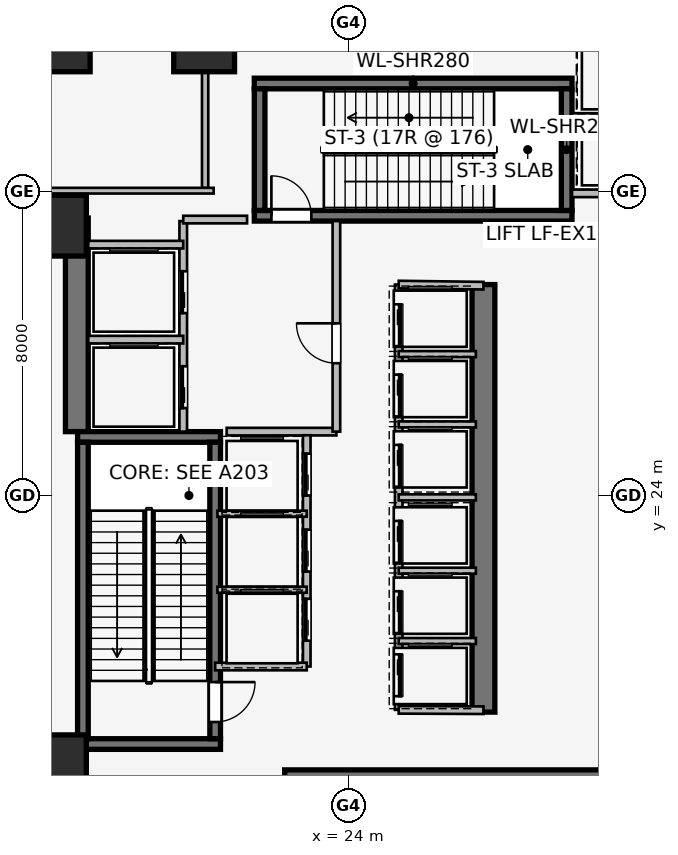
"""IFC4 building model, lengths in metres.
Left out: names, types, materials, properties, quantities, classifications, styles, units other than length and angle.
Written with IfcOpenShell. Run it as: python <this file> out.ifc"""

import sys

from ifc_helpers import new_model, si_unit, direction, frame, frame_2d, origin, origin_2d, place, context, subcontext, project, spatial, rectangle, extrude, element, fill, save


model = new_model("IFC4")
c1 = context("Model", 3, precision=1e-05, world=origin(), true_north=direction((0.0, 1.0)))
c2 = subcontext(c1, "Body", "Model", "MODEL_VIEW")
j1 = project(units=[si_unit("LENGTHUNIT", "METRE"), si_unit("PLANEANGLEUNIT", "RADIAN")], contexts=[c1])
p1 = place(None, origin())
s1 = spatial("IfcSite", under=j1, at=p1, CompositionType="ELEMENT")
p2 = place(p1, origin())
s2 = spatial("IfcBuilding", under=s1, at=p2, CompositionType="ELEMENT")
p3 = place(p2, origin())
s3 = spatial("IfcBuildingStorey", under=s2, at=p3, CompositionType="ELEMENT", Elevation=0.0)
p4 = place(p3, frame((16.85, 25.68, 0.0), z_axis=(0.0, 0.0, 1.0), x_axis=(0.0, 1.0, 0.0)))
e1 = element("IfcWall", 1, at=p4, inside=s3, PredefinedType="SHEAR", context=c2, shape_type="SweptSolid", body=[
    extrude(rectangle(XDim=5.62, YDim=0.6, at=frame_2d((2.81, 0.0))), origin(), (0.0, 0.0, 1.0), 6.0),
])
p5 = place(p3, frame((27.55, 29.55, 0.0), z_axis=(0.0, 0.0, 1.0), x_axis=(0.0, -1.0, 0.0)))
e2 = element("IfcWall", 2, at=p5, inside=s3, PredefinedType="SHEAR", context=c2, shape_type="SweptSolid", body=[
    extrude(rectangle(XDim=11.25, YDim=0.6, at=frame_2d((5.625, 0.0))), origin(), (0.0, 0.0, 1.0), 6.0),
])
for number, where, z_axis, x_axis in (
    (3, (16.87, 17.46, 0.0), (0.0, 0.0, 1.0), (1.0, 0.0, 0.0)),
    (4, (20.63, 25.54, 0.0), (0.0, 0.0, 1.0), (-1.0, 0.0, 0.0)),
):
    element("IfcWall", number, at=place(p3, frame(where, z_axis=z_axis, x_axis=x_axis)), inside=s3, PredefinedType="SHEAR", context=c2, shape_type="SweptSolid", body=[
        extrude(rectangle(XDim=3.76, YDim=0.28, at=frame_2d((1.88, 0.0))), origin(), (0.0, 0.0, 1.0), 6.0),
    ])
p6 = place(p3, frame((17.01, 25.4, 0.0), z_axis=(0.0, 0.0, 1.0), x_axis=(0.0, -1.0, 0.0)))
e5 = element("IfcWall", 5, at=p6, inside=s3, PredefinedType="SHEAR", context=c2, shape_type="SweptSolid", body=[
    extrude(rectangle(XDim=7.8, YDim=0.28, at=frame_2d((3.9, 0.0))), origin(), (0.0, 0.0, 1.0), 6.0),
])
p7 = place(p3, frame((20.49, 25.4, 0.0), z_axis=(0.0, 0.0, 1.0), x_axis=(0.0, -1.0, 0.0)))
e6 = element("IfcWall", 6, at=p7, inside=s3, PredefinedType="SHEAR", context=c2, shape_type="SweptSolid", body=[
    extrude(rectangle(XDim=7.8, YDim=0.28, at=frame_2d((3.9, 0.0))), origin(), (0.0, 0.0, 1.0), 6.0),
])
p8 = place(p7, frame((6.31, 0.0, 0.0)))
e7 = element("IfcOpeningElement", 7, at=p8, cuts=e6, PredefinedType="OPENING", context=c2, shape_type="SweptSolid", body=[
    extrude(rectangle(XDim=1.05, YDim=2.0, at=frame_2d((0.525, 1.0))), frame((0.0, 0.15, 0.0), z_axis=(0.0, -1.0, 0.0), x_axis=(1.0, 0.0, 0.0)), (0.0, 0.0, 1.0), 0.3),
])
p9 = place(p3, frame((30.68, 16.64, 0.0), z_axis=(0.0, 0.0, 1.0), x_axis=(-1.0, 0.0, 0.0)))
e8 = element("IfcWall", 8, at=p9, inside=s3, PredefinedType="SHEAR", context=c2, shape_type="SweptSolid", body=[
    extrude(rectangle(XDim=8.36, YDim=0.28, at=frame_2d((4.18, 0.0))), origin(), (0.0, 0.0, 1.0), 6.0),
])
p10 = place(p3, frame((21.52, 31.36, 0.0), z_axis=(0.0, 0.0, 1.0), x_axis=(1.0, 0.0, 0.0)))
e9 = element("IfcWall", 9, at=p10, inside=s3, PredefinedType="SHEAR", context=c2, shape_type="SweptSolid", body=[
    extrude(rectangle(XDim=8.36, YDim=0.28, at=frame_2d((4.18, 0.0))), origin(), (0.0, 0.0, 1.0), 6.0),
])
p11 = place(p10, frame((0.45, 0.0, 0.0)))
e10 = element("IfcOpeningElement", 10, at=p11, cuts=e9, PredefinedType="OPENING", context=c2, shape_type="SweptSolid", body=[
    extrude(rectangle(XDim=1.05, YDim=2.0, at=frame_2d((0.525, 1.0))), frame((0.0, 0.15, 0.0), z_axis=(0.0, -1.0, 0.0), x_axis=(1.0, 0.0, 0.0)), (0.0, 0.0, 1.0), 0.3),
])
p12 = place(p3, frame((29.88, 34.84, 0.0), z_axis=(0.0, 0.0, 1.0), x_axis=(-1.0, 0.0, 0.0)))
e11 = element("IfcWall", 11, at=p12, inside=s3, PredefinedType="SHEAR", context=c2, shape_type="SweptSolid", body=[
    extrude(rectangle(XDim=8.36, YDim=0.28, at=frame_2d((4.18, 0.0))), origin(), (0.0, 0.0, 1.0), 6.0),
])
for number, where, z_axis, x_axis in (
    (12, (21.66, 34.7, 0.0), (0.0, 0.0, 1.0), (0.0, -1.0, 0.0)),
    (13, (29.74, 31.5, 0.0), (0.0, 0.0, 1.0), (0.0, 1.0, 0.0)),
):
    element("IfcWall", number, at=place(p3, frame(where, z_axis=z_axis, x_axis=x_axis)), inside=s3, PredefinedType="SHEAR", context=c2, shape_type="SweptSolid", body=[
        extrude(rectangle(XDim=3.2, YDim=0.28, at=frame_2d((1.6, 0.0))), origin(), (0.0, 0.0, 1.0), 6.0),
    ])
for number, where, z_axis, x_axis in (
    (14, (16.3, 16.9, 0.0), (0.0, 0.0, 1.0), (1.0, 0.0, 0.0)),
    (15, (16.3, 31.1, 0.0), (0.0, 0.0, 1.0), (1.0, 0.0, 0.0)),
    (16, (20.2, 35.95, 0.0), (0.0, 0.0, 1.0), (1.0, 0.0, 0.0)),
    (17, (16.4, 35.95, 0.0), (0.0, 0.0, 1.0), (1.0, 0.0, 0.0)),
):
    element("IfcColumn", number, at=place(p3, frame(where, z_axis=z_axis, x_axis=x_axis)), inside=s3, PredefinedType="COLUMN", context=c2, shape_type="SweptSolid", body=[
        extrude(rectangle(XDim=1.6, YDim=1.6, at=origin_2d()), origin(), (0.0, 0.0, 1.0), 6.0),
    ])
p13 = place(p3, frame((19.65, 25.68, 0.0), z_axis=(0.0, 0.0, 1.0), x_axis=(0.0, 1.0, 0.0)))
e18 = element("IfcWall", 18, at=p13, inside=s3, PredefinedType="PARTITIONING", context=c2, shape_type="SweptSolid", body=[
    extrude(rectangle(XDim=5.54, YDim=0.2, at=frame_2d((2.77, 0.0))), origin(), (0.0, 0.0, 1.0), 5.69),
])
p14 = place(p13, frame((0.62, 0.0, 0.0)))
e19 = element("IfcOpeningElement", 19, at=p14, cuts=e18, PredefinedType="OPENING", context=c2, shape_type="SweptSolid", body=[
    extrude(rectangle(XDim=1.1, YDim=2.2, at=frame_2d((0.55, 1.1))), frame((0.0, 0.11, 0.0), z_axis=(0.0, -1.0, 0.0), x_axis=(1.0, 0.0, 0.0)), (0.0, 0.0, 1.0), 0.22),
])
p15 = place(p13, frame((3.12, 0.0, 0.0)))
e20 = element("IfcOpeningElement", 20, at=p15, cuts=e18, PredefinedType="OPENING", context=c2, shape_type="SweptSolid", body=[
    extrude(rectangle(XDim=1.1, YDim=2.2, at=frame_2d((0.55, 1.1))), frame((0.0, 0.11, 0.0), z_axis=(0.0, -1.0, 0.0), x_axis=(1.0, 0.0, 0.0)), (0.0, 0.0, 1.0), 0.22),
])
p16 = place(p3, frame((20.793, 25.68, 0.0), z_axis=(0.0, 0.0, 1.0), x_axis=(1.0, 0.0, 0.0)))
e21 = element("IfcWall", 21, at=p16, inside=s3, PredefinedType="PARTITIONING", context=c2, shape_type="SweptSolid", body=[
    extrude(rectangle(XDim=2.887, YDim=0.2, at=frame_2d((1.443, 0.0))), origin(), (0.0, 0.0, 1.0), 5.69),
])
p17 = place(p3, frame((23.68, 25.68, 0.0), z_axis=(0.0, 0.0, 1.0), x_axis=(0.0, 1.0, 0.0)))
e22 = element("IfcWall", 22, at=p17, inside=s3, PredefinedType="PARTITIONING", context=c2, shape_type="SweptSolid", body=[
    extrude(rectangle(XDim=5.54, YDim=0.2, at=frame_2d((2.77, 0.0))), origin(), (0.0, 0.0, 1.0), 5.69),
])
p18 = place(p17, frame((1.8, 0.0, 0.0)))
e23 = element("IfcOpeningElement", 23, at=p18, cuts=e22, PredefinedType="OPENING", context=c2, shape_type="SweptSolid", body=[
    extrude(rectangle(XDim=1.05, YDim=2.0, at=frame_2d((0.525, 1.0))), frame((0.0, 0.11, 0.0), z_axis=(0.0, -1.0, 0.0), x_axis=(1.0, 0.0, 0.0)), (0.0, 0.0, 1.0), 0.22),
])
p19 = place(p3, frame((21.33, 31.26, 0.0), z_axis=(0.0, 0.0, 1.0), x_axis=(-1.0, 0.0, 0.0)))
e24 = element("IfcWall", 24, at=p19, inside=s3, PredefinedType="PARTITIONING", context=c2, shape_type="SweptSolid", body=[
    extrude(rectangle(XDim=1.68, YDim=0.2, at=frame_2d((0.84, 0.0))), origin(), (0.0, 0.0, 1.0), 5.69),
])
p20 = place(p3, frame((17.15, 28.1, 0.0), z_axis=(0.0, 0.0, 1.0), x_axis=(1.0, 0.0, 0.0)))
e25 = element("IfcWall", 25, at=p20, inside=s3, PredefinedType="PARTITIONING", context=c2, shape_type="SweptSolid", body=[
    extrude(rectangle(XDim=2.5, YDim=0.2, at=frame_2d((1.25, 0.0))), origin(), (0.0, 0.0, 1.0), 5.69),
])
p21 = place(p3, frame((19.65, 30.6, 0.0), z_axis=(0.0, 0.0, 1.0), x_axis=(-1.0, 0.0, 0.0)))
e26 = element("IfcWall", 26, at=p21, inside=s3, PredefinedType="PARTITIONING", context=c2, shape_type="SweptSolid", body=[
    extrude(rectangle(XDim=2.5, YDim=0.2, at=frame_2d((1.25, 0.0))), origin(), (0.0, 0.0, 1.0), 4.59),
])
p22 = place(p3, frame((32.48, 31.95, 0.0), z_axis=(0.0, 0.0, 1.0), x_axis=(-1.0, 0.0, 0.0)))
e27 = element("IfcWall", 27, at=p22, inside=s3, PredefinedType="PARTITIONING", context=c2, shape_type="SweptSolid", body=[
    extrude(rectangle(XDim=2.6, YDim=0.2, at=frame_2d((1.3, 0.0))), origin(), (0.0, 0.0, 1.0), 5.69),
])
p23 = place(p3, frame((29.875, 33.98, 0.0), z_axis=(0.0, 0.0, 1.0), x_axis=(1.0, 0.0, 0.0)))
e28 = element("IfcWall", 28, at=p23, inside=s3, PredefinedType="PARTITIONING", context=c2, shape_type="SweptSolid", body=[
    extrude(rectangle(XDim=2.605, YDim=0.16, at=frame_2d((1.302, 0.0))), origin(), (0.0, 0.0, 1.0), 5.69),
])
p24 = place(p3, frame((22.9, 19.5, 0.0), z_axis=(0.0, 0.0, 1.0), x_axis=(0.0, 1.0, 0.0)))
e29 = element("IfcWall", 29, at=p24, inside=s3, PredefinedType="PARTITIONING", context=c2, shape_type="SweptSolid", body=[
    extrude(rectangle(XDim=6.085, YDim=0.2, at=frame_2d((3.042, 0.0))), origin(), (0.0, 0.0, 1.0), 5.69),
])
p25 = place(p24, frame((0.68, 0.0, 0.0)))
e30 = element("IfcOpeningElement", 30, at=p25, cuts=e29, PredefinedType="OPENING", context=c2, shape_type="SweptSolid", body=[
    extrude(rectangle(XDim=1.1, YDim=2.2, at=frame_2d((0.55, 1.1))), frame((0.0, 0.11, 0.0), z_axis=(0.0, -1.0, 0.0), x_axis=(1.0, 0.0, 0.0)), (0.0, 0.0, 1.0), 0.22),
])
p26 = place(p24, frame((2.5, 0.0, 0.0)))
e31 = element("IfcOpeningElement", 31, at=p26, cuts=e29, PredefinedType="OPENING", context=c2, shape_type="SweptSolid", body=[
    extrude(rectangle(XDim=1.1, YDim=2.2, at=frame_2d((0.55, 1.1))), frame((0.0, 0.11, 0.0), z_axis=(0.0, -1.0, 0.0), x_axis=(1.0, 0.0, 0.0)), (0.0, 0.0, 1.0), 0.22),
])
p27 = place(p24, frame((4.5, 0.0, 0.0)))
e32 = element("IfcOpeningElement", 32, at=p27, cuts=e29, PredefinedType="OPENING", context=c2, shape_type="SweptSolid", body=[
    extrude(rectangle(XDim=1.1, YDim=2.2, at=frame_2d((0.55, 1.1))), frame((0.0, 0.11, 0.0), z_axis=(0.0, -1.0, 0.0), x_axis=(1.0, 0.0, 0.0)), (0.0, 0.0, 1.0), 0.22),
])
p28 = place(p3, frame((20.49, 19.5, 0.0), z_axis=(0.0, 0.0, 1.0), x_axis=(1.0, 0.0, 0.0)))
e33 = element("IfcWall", 33, at=p28, inside=s3, PredefinedType="PARTITIONING", context=c2, shape_type="SweptSolid", body=[
    extrude(rectangle(XDim=2.41, YDim=0.2, at=frame_2d((1.205, 0.0))), origin(), (0.0, 0.0, 1.0), 4.59),
])
for number, where, z_axis, x_axis in (
    (34, (20.55, 21.52, 0.0), (0.0, 0.0, 1.0), (1.0, 0.0, 0.0)),
    (35, (20.55, 23.52, 0.0), (0.0, 0.0, 1.0), (1.0, 0.0, 0.0)),
):
    element("IfcWall", number, at=place(p3, frame(where, z_axis=z_axis, x_axis=x_axis)), inside=s3, PredefinedType="PARTITIONING", context=c2, shape_type="SweptSolid", body=[
        extrude(rectangle(XDim=2.35, YDim=0.16, at=frame_2d((1.175, 0.0))), origin(), (0.0, 0.0, 1.0), 5.69),
    ])
p29 = place(p3, frame((25.32, 29.55, 0.0), z_axis=(0.0, 0.0, 1.0), x_axis=(0.0, -1.0, 0.0)))
e36 = element("IfcWall", 36, at=p29, inside=s3, PredefinedType="PARTITIONING", context=c2, shape_type="SweptSolid", body=[
    extrude(rectangle(XDim=11.19, YDim=0.2, at=frame_2d((5.595, 0.0))), origin(), (0.0, 0.0, 1.0), 5.69),
])
p30 = place(p29, frame((0.52, 0.0, 0.0)))
e37 = element("IfcOpeningElement", 37, at=p30, cuts=e36, PredefinedType="OPENING", context=c2, shape_type="SweptSolid", body=[
    extrude(rectangle(XDim=1.1, YDim=2.2, at=frame_2d((0.55, 1.1))), frame((0.0, 0.11, 0.0), z_axis=(0.0, -1.0, 0.0), x_axis=(1.0, 0.0, 0.0)), (0.0, 0.0, 1.0), 0.22),
])
p31 = place(p29, frame((2.37, 0.0, 0.0)))
e38 = element("IfcOpeningElement", 38, at=p31, cuts=e36, PredefinedType="OPENING", context=c2, shape_type="SweptSolid", body=[
    extrude(rectangle(XDim=1.1, YDim=2.2, at=frame_2d((0.55, 1.1))), frame((0.0, 0.11, 0.0), z_axis=(0.0, -1.0, 0.0), x_axis=(1.0, 0.0, 0.0)), (0.0, 0.0, 1.0), 0.22),
])
p32 = place(p29, frame((4.22, 0.0, 0.0)))
e39 = element("IfcOpeningElement", 39, at=p32, cuts=e36, PredefinedType="OPENING", context=c2, shape_type="SweptSolid", body=[
    extrude(rectangle(XDim=1.1, YDim=2.2, at=frame_2d((0.55, 1.1))), frame((0.0, 0.11, 0.0), z_axis=(0.0, -1.0, 0.0), x_axis=(1.0, 0.0, 0.0)), (0.0, 0.0, 1.0), 0.22),
])
p33 = place(p29, frame((6.22, 0.0, 0.0)))
e40 = element("IfcOpeningElement", 40, at=p33, cuts=e36, PredefinedType="OPENING", context=c2, shape_type="SweptSolid", body=[
    extrude(rectangle(XDim=1.1, YDim=2.2, at=frame_2d((0.55, 1.1))), frame((0.0, 0.11, 0.0), z_axis=(0.0, -1.0, 0.0), x_axis=(1.0, 0.0, 0.0)), (0.0, 0.0, 1.0), 0.22),
])
p34 = place(p29, frame((8.07, 0.0, 0.0)))
e41 = element("IfcOpeningElement", 41, at=p34, cuts=e36, PredefinedType="OPENING", context=c2, shape_type="SweptSolid", body=[
    extrude(rectangle(XDim=1.1, YDim=2.2, at=frame_2d((0.55, 1.1))), frame((0.0, 0.11, 0.0), z_axis=(0.0, -1.0, 0.0), x_axis=(1.0, 0.0, 0.0)), (0.0, 0.0, 1.0), 0.22),
])
p35 = place(p29, frame((9.73, 0.0, 0.0)))
e42 = element("IfcOpeningElement", 42, at=p35, cuts=e36, PredefinedType="OPENING", context=c2, shape_type="SweptSolid", body=[
    extrude(rectangle(XDim=1.1, YDim=2.2, at=frame_2d((0.55, 1.1))), frame((0.0, 0.11, 0.0), z_axis=(0.0, -1.0, 0.0), x_axis=(1.0, 0.0, 0.0)), (0.0, 0.0, 1.0), 0.22),
])
p36 = place(p3, frame((25.32, 18.36, 0.0), z_axis=(0.0, 0.0, 1.0), x_axis=(0.999989925833, -0.004488678231, 0.0)))
e43 = element("IfcWall", 43, at=p36, inside=s3, PredefinedType="PARTITIONING", context=c2, shape_type="SweptSolid", body=[
    extrude(rectangle(XDim=2.23, YDim=0.2, at=frame_2d((1.115, 0.0))), origin(), (0.0, 0.0, 1.0), 5.69),
])
p37 = place(p3, frame((27.55, 29.52, 0.0), z_axis=(0.0, 0.0, 1.0), x_axis=(-0.999909343457, 0.013464949556, 0.0)))
e44 = element("IfcWall", 44, at=p37, inside=s3, PredefinedType="PARTITIONING", context=c2, shape_type="SweptSolid", body=[
    extrude(rectangle(XDim=2.23, YDim=0.2, at=frame_2d((1.115, 0.0))), origin(), (0.0, 0.0, 1.0), 4.59),
])
for number, where, z_axis, x_axis in (
    (45, (25.32, 20.17, 0.0), (0.0, 0.0, 1.0), (1.0, 0.0, 0.0)),
    (46, (25.32, 22.02, 0.0), (0.0, 0.0, 1.0), (1.0, 0.0, 0.0)),
    (47, (25.32, 23.95, 0.0), (0.0, 0.0, 1.0), (1.0, 0.0, 0.0)),
    (48, (25.32, 25.87, 0.0), (0.0, 0.0, 1.0), (1.0, 0.0, 0.0)),
    (49, (25.32, 27.72, 0.0), (0.0, 0.0, 1.0), (1.0, 0.0, 0.0)),
):
    element("IfcWall", number, at=place(p3, frame(where, z_axis=z_axis, x_axis=x_axis)), inside=s3, PredefinedType="PARTITIONING", context=c2, shape_type="SweptSolid", body=[
        extrude(rectangle(XDim=2.03, YDim=0.16, at=frame_2d((1.015, 0.0))), origin(), (0.0, 0.0, 1.0), 5.69),
    ])
p38 = place(p3, frame((20.226, 32.09, 0.0), z_axis=(0.0, 0.0, 1.0), x_axis=(0.0, 1.0, 0.0)))
e50 = element("IfcWall", 50, at=p38, inside=s3, PredefinedType="PARTITIONING", context=c2, shape_type="SweptSolid", body=[
    extrude(rectangle(XDim=15.64, YDim=0.165, at=frame_2d((7.82, 0.0))), origin(), (0.0, 0.0, 1.0), 5.69),
])
p39 = place(p3, frame((20.45, 32.02, 0.0), z_axis=(0.0, 0.0, 1.0), x_axis=(-1.0, 0.0, 0.0)))
e51 = element("IfcWall", 51, at=p39, inside=s3, PredefinedType="PARTITIONING", context=c2, shape_type="SweptSolid", body=[
    extrude(rectangle(XDim=20.055, YDim=0.15, at=frame_2d((10.027, 0.0))), origin(), (0.0, 0.0, 1.0), 4.742),
])
p40 = place(p39, frame((9.5, 0.0, 0.0)))
e52 = element("IfcOpeningElement", 52, at=p40, cuts=e51, PredefinedType="OPENING", context=c2, shape_type="SweptSolid", body=[
    extrude(rectangle(XDim=0.96, YDim=2.0, at=frame_2d((0.48, 1.0))), frame((0.0, 0.085, 0.0), z_axis=(0.0, -1.0, 0.0), x_axis=(1.0, 0.0, 0.0)), (0.0, 0.0, 1.0), 0.17),
])
p41 = place(p8, origin())
e53 = element("IfcDoor", 53, at=p41, inside=s3, OperationType="SINGLE_SWING_LEFT", PredefinedType="DOOR", context=c2, shape_type="SweptSolid", body=[
    extrude(rectangle(XDim=1.05, YDim=2.0, at=frame_2d((0.525, 1.0))), frame((0.0, 0.025, 0.0), z_axis=(0.0, -1.0, 0.0), x_axis=(1.0, 0.0, 0.0)), (0.0, 0.0, 1.0), 0.05),
])
fill(e7, e53)
p42 = place(p11, origin())
e54 = element("IfcDoor", 54, at=p42, inside=s3, OperationType="SINGLE_SWING_LEFT", PredefinedType="DOOR", context=c2, shape_type="SweptSolid", body=[
    extrude(rectangle(XDim=1.05, YDim=2.0, at=frame_2d((0.525, 1.0))), frame((0.0, 0.025, 0.0), z_axis=(0.0, -1.0, 0.0), x_axis=(1.0, 0.0, 0.0)), (0.0, 0.0, 1.0), 0.05),
])
fill(e10, e54)
p43 = place(p14, origin())
e55 = element("IfcDoor", 55, at=p43, inside=s3, OperationType="SLIDING_TO_LEFT", PredefinedType="DOOR", context=c2, shape_type="SweptSolid", body=[
    extrude(rectangle(XDim=1.1, YDim=2.2, at=frame_2d((0.55, 1.1))), frame((0.0, 0.025, 0.0), z_axis=(0.0, -1.0, 0.0), x_axis=(1.0, 0.0, 0.0)), (0.0, 0.0, 1.0), 0.05),
])
fill(e19, e55)
p44 = place(p15, origin())
e56 = element("IfcDoor", 56, at=p44, inside=s3, OperationType="SLIDING_TO_LEFT", PredefinedType="DOOR", context=c2, shape_type="SweptSolid", body=[
    extrude(rectangle(XDim=1.1, YDim=2.2, at=frame_2d((0.55, 1.1))), frame((0.0, 0.025, 0.0), z_axis=(0.0, -1.0, 0.0), x_axis=(1.0, 0.0, 0.0)), (0.0, 0.0, 1.0), 0.05),
])
fill(e20, e56)
p45 = place(p18, origin())
e57 = element("IfcDoor", 57, at=p45, inside=s3, OperationType="SINGLE_SWING_RIGHT", PredefinedType="DOOR", context=c2, shape_type="SweptSolid", body=[
    extrude(rectangle(XDim=1.05, YDim=2.0, at=frame_2d((0.525, 1.0))), frame((0.0, 0.025, 0.0), z_axis=(0.0, -1.0, 0.0), x_axis=(1.0, 0.0, 0.0)), (0.0, 0.0, 1.0), 0.05),
])
fill(e23, e57)
p46 = place(p25, origin())
e58 = element("IfcDoor", 58, at=p46, inside=s3, OperationType="SLIDING_TO_LEFT", PredefinedType="DOOR", context=c2, shape_type="SweptSolid", body=[
    extrude(rectangle(XDim=1.1, YDim=2.2, at=frame_2d((0.55, 1.1))), frame((0.0, 0.025, 0.0), z_axis=(0.0, -1.0, 0.0), x_axis=(1.0, 0.0, 0.0)), (0.0, 0.0, 1.0), 0.05),
])
fill(e30, e58)
p47 = place(p26, origin())
e59 = element("IfcDoor", 59, at=p47, inside=s3, OperationType="SLIDING_TO_LEFT", PredefinedType="DOOR", context=c2, shape_type="SweptSolid", body=[
    extrude(rectangle(XDim=1.1, YDim=2.2, at=frame_2d((0.55, 1.1))), frame((0.0, 0.025, 0.0), z_axis=(0.0, -1.0, 0.0), x_axis=(1.0, 0.0, 0.0)), (0.0, 0.0, 1.0), 0.05),
])
fill(e31, e59)
p48 = place(p27, origin())
e60 = element("IfcDoor", 60, at=p48, inside=s3, OperationType="SLIDING_TO_LEFT", PredefinedType="DOOR", context=c2, shape_type="SweptSolid", body=[
    extrude(rectangle(XDim=1.1, YDim=2.2, at=frame_2d((0.55, 1.1))), frame((0.0, 0.025, 0.0), z_axis=(0.0, -1.0, 0.0), x_axis=(1.0, 0.0, 0.0)), (0.0, 0.0, 1.0), 0.05),
])
fill(e32, e60)
p49 = place(p30, origin())
e61 = element("IfcDoor", 61, at=p49, inside=s3, OperationType="SLIDING_TO_LEFT", PredefinedType="DOOR", context=c2, shape_type="SweptSolid", body=[
    extrude(rectangle(XDim=1.1, YDim=2.2, at=frame_2d((0.55, 1.1))), frame((0.0, 0.025, 0.0), z_axis=(0.0, -1.0, 0.0), x_axis=(1.0, 0.0, 0.0)), (0.0, 0.0, 1.0), 0.05),
])
fill(e37, e61)
p50 = place(p31, origin())
e62 = element("IfcDoor", 62, at=p50, inside=s3, OperationType="SLIDING_TO_LEFT", PredefinedType="DOOR", context=c2, shape_type="SweptSolid", body=[
    extrude(rectangle(XDim=1.1, YDim=2.2, at=frame_2d((0.55, 1.1))), frame((0.0, 0.025, 0.0), z_axis=(0.0, -1.0, 0.0), x_axis=(1.0, 0.0, 0.0)), (0.0, 0.0, 1.0), 0.05),
])
fill(e38, e62)
p51 = place(p32, origin())
e63 = element("IfcDoor", 63, at=p51, inside=s3, OperationType="SLIDING_TO_LEFT", PredefinedType="DOOR", context=c2, shape_type="SweptSolid", body=[
    extrude(rectangle(XDim=1.1, YDim=2.2, at=frame_2d((0.55, 1.1))), frame((0.0, 0.025, 0.0), z_axis=(0.0, -1.0, 0.0), x_axis=(1.0, 0.0, 0.0)), (0.0, 0.0, 1.0), 0.05),
])
fill(e39, e63)
p52 = place(p33, origin())
e64 = element("IfcDoor", 64, at=p52, inside=s3, OperationType="SLIDING_TO_LEFT", PredefinedType="DOOR", context=c2, shape_type="SweptSolid", body=[
    extrude(rectangle(XDim=1.1, YDim=2.2, at=frame_2d((0.55, 1.1))), frame((0.0, 0.025, 0.0), z_axis=(0.0, -1.0, 0.0), x_axis=(1.0, 0.0, 0.0)), (0.0, 0.0, 1.0), 0.05),
])
fill(e40, e64)
p53 = place(p34, origin())
e65 = element("IfcDoor", 65, at=p53, inside=s3, OperationType="SLIDING_TO_LEFT", PredefinedType="DOOR", context=c2, shape_type="SweptSolid", body=[
    extrude(rectangle(XDim=1.1, YDim=2.2, at=frame_2d((0.55, 1.1))), frame((0.0, 0.025, 0.0), z_axis=(0.0, -1.0, 0.0), x_axis=(1.0, 0.0, 0.0)), (0.0, 0.0, 1.0), 0.05),
])
fill(e41, e65)
p54 = place(p35, origin())
e66 = element("IfcDoor", 66, at=p54, inside=s3, OperationType="SLIDING_TO_LEFT", PredefinedType="DOOR", context=c2, shape_type="SweptSolid", body=[
    extrude(rectangle(XDim=1.1, YDim=2.2, at=frame_2d((0.55, 1.1))), frame((0.0, 0.025, 0.0), z_axis=(0.0, -1.0, 0.0), x_axis=(1.0, 0.0, 0.0)), (0.0, 0.0, 1.0), 0.05),
])
fill(e42, e66)
save(model, sys.argv[1])
